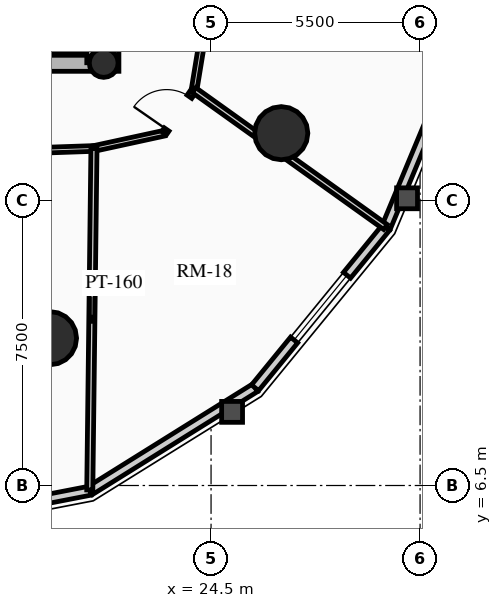
"""IFC4 building model, lengths in metres.
Left out: names, types, materials, properties, quantities, classifications, styles, units other than length and angle.
Written with IfcOpenShell. Run it as: python <this file> out.ifc"""

import sys

from ifc_helpers import new_model, si_unit, direction, frame, frame_2d, origin, origin_2d, place, context, subcontext, project, spatial, rectangle, circle, hollow_circle, extrude, source, transform, mapped, element, fill, save


model = new_model("IFC4")
c1 = context("Model", 3, precision=1e-05, world=origin(), true_north=direction((0.0, 1.0)))
c2 = subcontext(c1, "Body", "Model", "MODEL_VIEW")
j1 = project(units=[si_unit("LENGTHUNIT", "METRE"), si_unit("PLANEANGLEUNIT", "RADIAN")], contexts=[c1])
p1 = place(None, origin())
s1 = spatial("IfcSite", under=j1, at=p1, CompositionType="ELEMENT")
p2 = place(p1, origin())
s2 = spatial("IfcBuilding", under=s1, at=p2, CompositionType="ELEMENT")
p3 = place(p2, frame((0.0, 0.0, 81.79)))
s3 = spatial("IfcBuildingStorey", under=s2, at=p3, CompositionType="ELEMENT", Elevation=81.79)
p4 = place(p3, frame((21.85, 17.4, 0.0), z_axis=(0.0, 0.0, 1.0), x_axis=(0.0, 1.0, 0.0)))
e1 = element("IfcWall", 1, at=p4, inside=s3, PredefinedType="SHEAR", context=c2, shape_type="SweptSolid", body=[
    extrude(rectangle(XDim=14.2, YDim=0.45, at=frame_2d((7.1, 0.0))), origin(), (0.0, 0.0, 1.0), 2.91),
])
p5 = place(p3, frame((11.15, 17.625, 0.0), z_axis=(0.0, 0.0, 1.0), x_axis=(1.0, 0.0, 0.0)))
e2 = element("IfcWall", 2, at=p5, inside=s3, PredefinedType="SHEAR", context=c2, shape_type="SweptSolid", body=[
    extrude(rectangle(XDim=10.7, YDim=0.45, at=frame_2d((5.35, 0.0))), origin(), (0.0, 0.0, 1.0), 2.91),
])
m1 = source(origin(), c2, "Body", "SweptSolid", [
    extrude(rectangle(XDim=1.5, YDim=2.02, at=frame_2d((0.75, 1.01))), frame((0.0, 0.235, 0.0), z_axis=(0.0, -1.0, 0.0), x_axis=(1.0, 0.0, 0.0)), (0.0, 0.0, 1.0), 0.47),
])
p6 = place(p5, frame((5.45, 0.0, 0.0)))
e3 = element("IfcOpeningElement", 3, at=p6, cuts=e2, PredefinedType="OPENING", context=c2, shape_type="MappedRepresentation", body=[
    mapped(m1, transform((0.0, 0.0, 0.0), x_axis=(1.0, 0.0, 0.0), y_axis=(0.0, 1.0, 0.0), z_axis=(0.0, 0.0, 1.0), scale=1.0)),
])
p7 = place(p3, frame((21.405, 17.625, 0.0), z_axis=(0.0, 0.0, 1.0), x_axis=(0.0, 1.0, 0.0)))
e4 = element("IfcWall", 4, at=p7, inside=s3, PredefinedType="SHEAR", context=c2, shape_type="SweptSolid", body=[
    extrude(rectangle(XDim=6.72, YDim=0.35, at=frame_2d((3.36, 0.0))), origin(), (0.0, 0.0, 1.0), 2.91),
])
p8 = place(p3, frame((21.675, 17.62, 0.0), z_axis=(0.0, 0.0, 1.0), x_axis=(1.0, 0.0, 0.0)))
e5 = element("IfcColumn", 5, at=p8, inside=s3, PredefinedType="COLUMN", context=c2, shape_type="SweptSolid", body=[
    extrude(hollow_circle(Radius=0.38, WallThickness=0.032, at=origin_2d()), origin(), (0.0, 0.0, 1.0), 2.91),
])
for number, where, z_axis, x_axis in (
    (6, (20.261, 10.377, 0.0), (0.0, 0.0, 1.0), (1.0, 0.0, 0.0)),
    (7, (26.347, 15.771, 0.0), (0.0, 0.0, 1.0), (1.0, 0.0, 0.0)),
):
    element("IfcColumn", number, at=place(p3, frame(where, z_axis=z_axis, x_axis=x_axis)), inside=s3, PredefinedType="USERDEFINED", context=c2, shape_type="SweptSolid", body=[
        extrude(circle(Radius=0.7, at=origin_2d()), origin(), (0.0, 0.0, 1.0), 2.91),
    ])
p9 = place(p3, frame((21.315, 6.363, 0.0), z_axis=(0.0, 0.0, 1.0), x_axis=(-0.981723785992, -0.190311344954, 0.0)))
e8 = element("IfcWall", 8, at=p9, inside=s3, PredefinedType="SOLIDWALL", context=c2, shape_type="SweptSolid", body=[
    extrude(rectangle(XDim=4.904, YDim=0.24, at=frame_2d((2.452, 0.0))), origin(), (0.0, 0.0, 1.0), 2.179),
])
m2 = source(origin(), c2, "Body", "SweptSolid", [
    extrude(rectangle(XDim=1.9, YDim=1.35, at=frame_2d((0.95, 0.675))), frame((0.0, 0.13, 0.0), z_axis=(0.0, -1.0, 0.0), x_axis=(1.0, 0.0, 0.0)), (0.0, 0.0, 1.0), 0.26),
])
p10 = place(p9, frame((1.502, 0.0, 0.65)))
e9 = element("IfcOpeningElement", 9, at=p10, cuts=e8, PredefinedType="OPENING", context=c2, shape_type="MappedRepresentation", body=[
    mapped(m2, transform((0.0, 0.0, 0.0), x_axis=(1.0, 0.0, 0.0), y_axis=(0.0, 1.0, 0.0), z_axis=(0.0, 0.0, 1.0), scale=1.0)),
])
p11 = place(p3, frame((25.658, 9.072, 0.0), z_axis=(0.0, 0.0, 1.0), x_axis=(-0.848520380187, -0.529162701263, 0.0)))
e10 = element("IfcWall", 10, at=p11, inside=s3, PredefinedType="SOLIDWALL", context=c2, shape_type="SweptSolid", body=[
    extrude(rectangle(XDim=5.119, YDim=0.24, at=frame_2d((2.56, 0.0))), origin(), (0.0, 0.0, 1.0), 2.179),
])
p12 = place(p3, frame((29.105, 13.291, 0.0), z_axis=(0.0, 0.0, 1.0), x_axis=(-0.632700781152, -0.77439635945, 0.0)))
e11 = element("IfcWall", 11, at=p12, inside=s3, PredefinedType="SOLIDWALL", context=c2, shape_type="SweptSolid", body=[
    extrude(rectangle(XDim=5.448, YDim=0.24, at=frame_2d((2.724, 0.0))), origin(), (0.0, 0.0, 1.0), 2.179),
])
m3 = source(origin(), c2, "Body", "SweptSolid", [
    extrude(rectangle(XDim=2.2, YDim=1.35, at=frame_2d((1.1, 0.675))), frame((0.0, 0.13, 0.0), z_axis=(0.0, -1.0, 0.0), x_axis=(1.0, 0.0, 0.0)), (0.0, 0.0, 1.0), 0.26),
])
p13 = place(p12, frame((1.624, 0.0, 0.65)))
e12 = element("IfcOpeningElement", 12, at=p13, cuts=e11, PredefinedType="OPENING", context=c2, shape_type="MappedRepresentation", body=[
    mapped(m3, transform((0.0, 0.0, 0.0), x_axis=(1.0, 0.0, 0.0), y_axis=(0.0, 1.0, 0.0), z_axis=(0.0, 0.0, 1.0), scale=1.0)),
])
p14 = place(p3, frame((31.318, 18.607, 0.0), z_axis=(0.0, 0.0, 1.0), x_axis=(-0.384344417632, -0.923189779317, 0.0)))
e13 = element("IfcWall", 13, at=p14, inside=s3, PredefinedType="SOLIDWALL", context=c2, shape_type="SweptSolid", body=[
    extrude(rectangle(XDim=5.758, YDim=0.24, at=frame_2d((2.879, 0.0))), origin(), (0.0, 0.0, 1.0), 2.179),
])
p15 = place(p3, frame((14.781, 15.141, 0.0), z_axis=(0.0, 0.0, 1.0), x_axis=(0.999407918707, 0.034406569513, 0.0)))
e14 = element("IfcWall", 14, at=p15, inside=s3, PredefinedType="PARTITIONING", context=c2, shape_type="SweptSolid", body=[
    extrude(rectangle(XDim=6.642, YDim=0.15, at=frame_2d((3.321, 0.0))), origin(), (0.0, 0.0, 1.0), 2.225),
])
m4 = source(origin(), c2, "Body", "SweptSolid", [
    extrude(rectangle(XDim=1.05, YDim=2.015, at=frame_2d((0.525, 1.007))), frame((0.0, 0.085, 0.0), z_axis=(0.0, -1.0, 0.0), x_axis=(1.0, 0.0, 0.0)), (0.0, 0.0, 1.0), 0.17),
])
p16 = place(p15, frame((2.796, 0.0, 0.0)))
e15 = element("IfcOpeningElement", 15, at=p16, cuts=e14, PredefinedType="OPENING", context=c2, shape_type="MappedRepresentation", body=[
    mapped(m4, transform((0.0, 0.0, 0.0), x_axis=(1.0, 0.0, 0.0), y_axis=(0.0, 1.0, 0.0), z_axis=(0.0, 0.0, 1.0), scale=1.0)),
])
p17 = place(p3, frame((21.419, 15.369, 0.0), z_axis=(0.0, 0.0, 1.0), x_axis=(0.977192701953, 0.212354475464, 0.0)))
e16 = element("IfcWall", 16, at=p17, inside=s3, PredefinedType="PARTITIONING", context=c2, shape_type="SweptSolid", body=[
    extrude(rectangle(XDim=1.888, YDim=0.15, at=frame_2d((0.944, 0.0))), origin(), (0.0, 0.0, 1.0), 2.225),
])
p18 = place(p3, frame((23.263, 15.77, 0.0), z_axis=(0.0, 0.0, 1.0), x_axis=(0.570743456919, 0.821128434768, 0.0)))
e17 = element("IfcWall", 17, at=p18, inside=s3, PredefinedType="PARTITIONING", context=c2, shape_type="SweptSolid", body=[
    extrude(rectangle(XDim=1.382, YDim=0.15, at=frame_2d((0.691, 0.0))), origin(), (0.0, 0.0, 1.0), 2.225),
])
p19 = place(p18, frame((0.12, 0.0, 0.0)))
e18 = element("IfcOpeningElement", 18, at=p19, cuts=e17, PredefinedType="OPENING", context=c2, shape_type="MappedRepresentation", body=[
    mapped(m4, transform((0.0, 0.0, 0.0), x_axis=(1.0, 0.0, 0.0), y_axis=(0.0, 1.0, 0.0), z_axis=(0.0, 0.0, 1.0), scale=1.0)),
])
p20 = place(p3, frame((24.052, 16.905, 0.0), z_axis=(0.0, 0.0, 1.0), x_axis=(0.162091534225, 0.986775726562, 0.0)))
e19 = element("IfcWall", 19, at=p20, inside=s3, PredefinedType="PARTITIONING", context=c2, shape_type="SweptSolid", body=[
    extrude(rectangle(XDim=1.613, YDim=0.15, at=frame_2d((0.807, 0.0))), origin(), (0.0, 0.0, 1.0), 2.225),
])
p21 = place(p3, frame((21.419, 15.369, 0.0), z_axis=(0.0, 0.0, 1.0), x_axis=(-0.012251185903, -0.999924951406, 0.0)))
e20 = element("IfcWall", 20, at=p21, inside=s3, PredefinedType="PARTITIONING", context=c2, shape_type="SweptSolid", body=[
    extrude(rectangle(XDim=8.988, YDim=0.16, at=frame_2d((4.494, 0.0))), origin(), (0.0, 0.0, 1.0), 2.179),
])
p22 = place(p3, frame((24.052, 16.905, 0.0), z_axis=(0.0, 0.0, 1.0), x_axis=(0.813437670746, -0.581652091727, 0.0)))
e21 = element("IfcWall", 21, at=p22, inside=s3, PredefinedType="PARTITIONING", context=c2, shape_type="SweptSolid", body=[
    extrude(rectangle(XDim=6.192, YDim=0.16, at=frame_2d((3.096, 0.0))), origin(), (0.0, 0.0, 1.0), 2.179),
])
m5 = source(origin(), c2, "Body", "SweptSolid", [
    extrude(rectangle(XDim=2.2, YDim=1.35, at=frame_2d((1.1, 0.675))), frame((0.0, 0.03, 0.0), z_axis=(0.0, -1.0, 0.0), x_axis=(1.0, 0.0, 0.0)), (0.0, 0.0, 1.0), 0.06),
])
p23 = place(p13, origin())
e22 = element("IfcWindow", 22, at=p23, inside=s3, PartitioningType="DOUBLE_PANEL_VERTICAL", PredefinedType="WINDOW", context=c2, shape_type="MappedRepresentation", body=[
    mapped(m5, transform((0.0, 0.0, 0.0), x_axis=(1.0, 0.0, 0.0), y_axis=(0.0, 1.0, 0.0), z_axis=(0.0, 0.0, 1.0), scale=1.0)),
])
fill(e12, e22)
m6 = source(origin(), c2, "Body", "SweptSolid", [
    extrude(rectangle(XDim=1.05, YDim=2.015, at=frame_2d((0.525, 1.007))), frame((0.0, 0.025, 0.0), z_axis=(0.0, -1.0, 0.0), x_axis=(1.0, 0.0, 0.0)), (0.0, 0.0, 1.0), 0.05),
])
p24 = place(p19, origin())
e23 = element("IfcDoor", 23, at=p24, inside=s3, OperationType="SINGLE_SWING_LEFT", PredefinedType="DOOR", context=c2, shape_type="MappedRepresentation", body=[
    mapped(m6, transform((0.0, 0.0, 0.0), x_axis=(1.0, 0.0, 0.0), y_axis=(0.0, 1.0, 0.0), z_axis=(0.0, 0.0, 1.0), scale=1.0)),
])
fill(e18, e23)
save(model, sys.argv[1])
